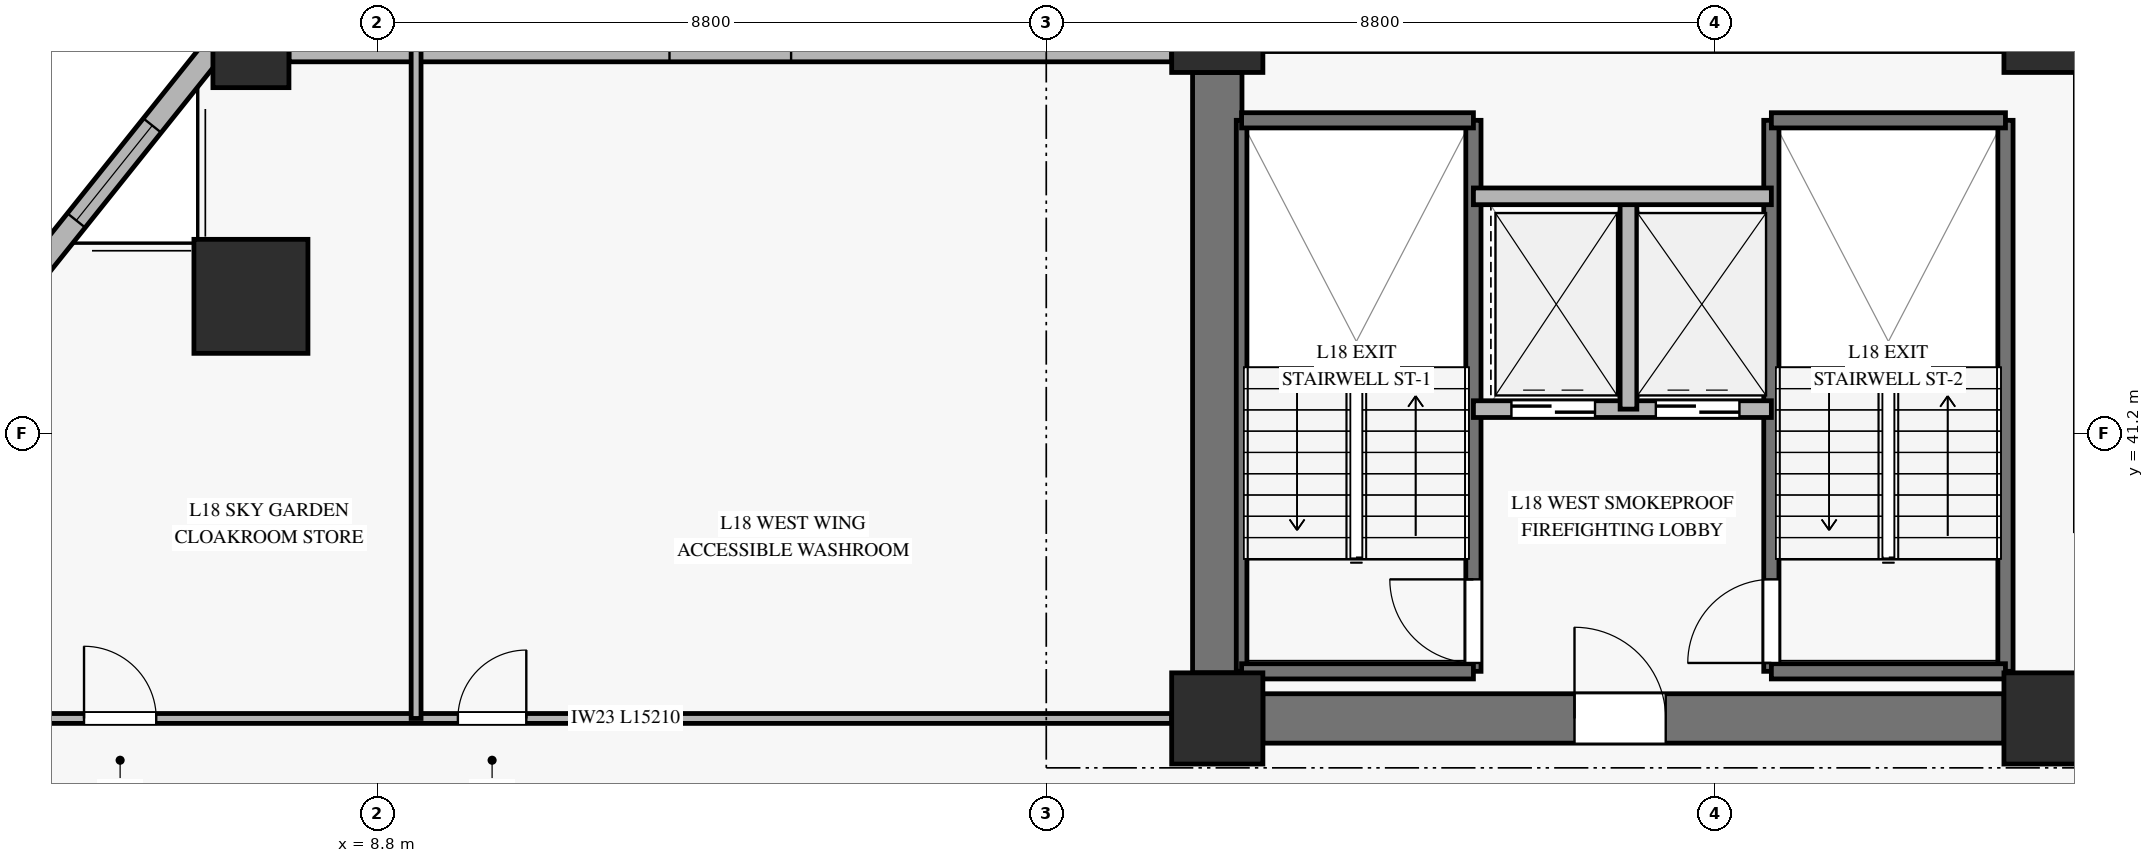
"""IFC4 building model, lengths in metres.
Left out: names, types, materials, properties, quantities, classifications, styles, units other than length and angle.
Written with IfcOpenShell. Run it as: python <this file> out.ifc"""

import sys

from ifc_helpers import new_model, si_unit, direction, frame, frame_2d, origin, origin_2d, place, context, subcontext, project, spatial, rectangle, hollow_rectangle, extrude, source, transform, mapped, element, fill, save


model = new_model("IFC4")
c1 = context("Model", 3, precision=1e-05, world=origin(), true_north=direction((0.0, 1.0)))
c2 = subcontext(c1, "Body", "Model", "MODEL_VIEW")
j1 = project(units=[si_unit("LENGTHUNIT", "METRE"), si_unit("PLANEANGLEUNIT", "RADIAN")], contexts=[c1])
p1 = place(None, origin())
s1 = spatial("IfcSite", under=j1, at=p1, CompositionType="ELEMENT")
p2 = place(p1, origin())
s2 = spatial("IfcBuilding", under=s1, at=p2, CompositionType="ELEMENT")
p3 = place(p2, frame((0.0, 0.0, 72.8)))
s3 = spatial("IfcBuildingStorey", under=s2, at=p3, CompositionType="ELEMENT", Elevation=72.8)
m1 = source(origin(), c2, "Body", "SweptSolid", [
    extrude(rectangle(XDim=1.2, YDim=1.2, at=origin_2d()), origin(), (0.0, 0.0, 1.0), 6.58),
])
for number, where, z_axis, x_axis in (
    (1, (19.85, 37.45, 0.0), (0.0, 0.0, 1.0), (1.0, 0.0, 0.0)),
    (2, (19.85, 46.55, 0.0), (0.0, 0.0, 1.0), (1.0, 0.0, 0.0)),
    (3, (30.8, 37.45, 0.0), (0.0, 0.0, 1.0), (1.0, 0.0, 0.0)),
    (4, (30.8, 46.55, 0.0), (0.0, 0.0, 1.0), (1.0, 0.0, 0.0)),
):
    element("IfcColumn", number, at=place(p3, frame(where, z_axis=z_axis, x_axis=x_axis)), inside=s3, PredefinedType="PILASTER", context=c2, shape_type="MappedRepresentation", body=[
        mapped(m1, transform((0.0, 0.0, 0.0), x_axis=(1.0, 0.0, 0.0), y_axis=(0.0, 1.0, 0.0), z_axis=(0.0, 0.0, 1.0), scale=1.0)),
    ])
p4 = place(p3, frame((20.45, 37.45, 0.0), z_axis=(0.0, 0.0, 1.0), x_axis=(1.0, 0.0, 0.0)))
e5 = element("IfcWall", 5, at=p4, inside=s3, PredefinedType="SHEAR", context=c2, shape_type="SweptSolid", body=[
    extrude(rectangle(XDim=9.75, YDim=0.65, at=frame_2d((4.875, 0.0))), origin(), (0.0, 0.0, 1.0), 6.58),
])
p5 = place(p4, frame((4.1, 0.0, 0.0)))
e6 = element("IfcOpeningElement", 6, at=p5, cuts=e5, PredefinedType="OPENING", context=c2, shape_type="SweptSolid", body=[
    extrude(rectangle(XDim=1.2, YDim=2.15, at=frame_2d((0.6, 1.075))), frame((0.0, 0.335, 0.0), z_axis=(0.0, -1.0, 0.0), x_axis=(1.0, 0.0, 0.0)), (0.0, 0.0, 1.0), 0.67),
])
p6 = place(p3, frame((19.85, 38.05, 0.0), z_axis=(0.0, 0.0, 1.0), x_axis=(0.0, 1.0, 0.0)))
e7 = element("IfcWall", 7, at=p6, inside=s3, PredefinedType="SHEAR", context=c2, shape_type="SweptSolid", body=[
    extrude(rectangle(XDim=7.9, YDim=0.65, at=frame_2d((3.95, 0.0))), origin(), (0.0, 0.0, 1.0), 6.58),
])
m2 = source(origin(), c2, "Body", "SweptSolid", [
    extrude(hollow_rectangle(XDim=1.5, YDim=1.5, WallThickness=0.07, at=origin_2d()), origin(), (0.0, 0.0, 1.0), 6.58),
])
p7 = place(p3, frame((7.136, 43.004, 0.0), z_axis=(0.0, 0.0, 1.0), x_axis=(1.0, 0.0, 0.0)))
e8 = element("IfcColumn", 8, at=p7, inside=s3, PredefinedType="COLUMN", context=c2, shape_type="MappedRepresentation", body=[
    mapped(m2, transform((0.0, 0.0, 0.0), x_axis=(1.0, 0.0, 0.0), y_axis=(0.0, 1.0, 0.0), z_axis=(0.0, 0.0, 1.0), scale=1.0)),
])
m3 = source(origin(), c2, "Body", "SweptSolid", [
    extrude(hollow_rectangle(XDim=1.0, YDim=1.0, WallThickness=0.045, at=origin_2d()), origin(), (0.0, 0.0, 1.0), 6.58),
])
p8 = place(p3, frame((7.136, 46.25, 0.0), z_axis=(0.0, 0.0, 1.0), x_axis=(1.0, 0.0, 0.0)))
e9 = element("IfcColumn", 9, at=p8, inside=s3, PredefinedType="COLUMN", context=c2, shape_type="MappedRepresentation", body=[
    mapped(m3, transform((0.0, 0.0, 0.0), x_axis=(1.0, 0.0, 0.0), y_axis=(0.0, 1.0, 0.0), z_axis=(0.0, 0.0, 1.0), scale=1.0)),
])
p9 = place(p3, frame((7.636, 46.25, 0.0), z_axis=(0.0, 0.0, 1.0), x_axis=(1.0, 0.0, 0.0)))
e10 = element("IfcWall", 10, at=p9, inside=s3, PredefinedType="SOLIDWALL", context=c2, shape_type="SweptSolid", body=[
    extrude(rectangle(XDim=11.614, YDim=0.32, at=frame_2d((5.807, 0.0))), origin(), (0.0, 0.0, 1.0), 6.06),
])
p10 = place(p9, frame((5.007, 0.0, 0.45)))
e11 = element("IfcOpeningElement", 11, at=p10, cuts=e10, PredefinedType="OPENING", context=c2, shape_type="SweptSolid", body=[
    extrude(rectangle(XDim=1.6, YDim=2.0, at=frame_2d((0.8, 1.0))), frame((0.0, 0.17, 0.0), z_axis=(0.0, -1.0, 0.0), x_axis=(1.0, 0.0, 0.0)), (0.0, 0.0, 1.0), 0.34),
])
p11 = place(p3, frame((6.636, 46.25, 0.0), z_axis=(0.0, 0.0, 1.0), x_axis=(-0.624558938305, -0.780977677391, 0.0)))
e12 = element("IfcWall", 12, at=p11, inside=s3, PredefinedType="SOLIDWALL", context=c2, shape_type="SweptSolid", body=[
    extrude(rectangle(XDim=4.156, YDim=0.3, at=frame_2d((2.078, 0.0))), origin(), (0.0, 0.0, 1.0), 6.06),
])
p12 = place(p11, frame((1.278, 0.0, 0.45)))
e13 = element("IfcOpeningElement", 13, at=p12, cuts=e12, PredefinedType="OPENING", context=c2, shape_type="SweptSolid", body=[
    extrude(rectangle(XDim=1.6, YDim=2.0, at=frame_2d((0.8, 1.0))), frame((0.0, 0.16, 0.0), z_axis=(0.0, -1.0, 0.0), x_axis=(1.0, 0.0, 0.0)), (0.0, 0.0, 1.0), 0.32),
])
p13 = place(p3, frame((20.17, 38.07, 0.0), z_axis=(0.0, 0.0, 1.0), x_axis=(0.0, 1.0, 0.0)))
e14 = element("IfcWall", 14, at=p13, inside=s3, PredefinedType="SOLIDWALL", context=c2, shape_type="SweptSolid", body=[
    extrude(rectangle(XDim=7.25, YDim=0.14, at=frame_2d((3.625, 0.0))), origin(), (0.0, 0.0, 1.0), 6.8),
])
p14 = place(p3, frame((23.22, 38.07, 0.0), z_axis=(0.0, 0.0, 1.0), x_axis=(0.0, 1.0, 0.0)))
e15 = element("IfcWall", 15, at=p14, inside=s3, PredefinedType="SOLIDWALL", context=c2, shape_type="SweptSolid", body=[
    extrude(rectangle(XDim=7.25, YDim=0.2, at=frame_2d((3.625, 0.0))), origin(), (0.0, 0.0, 1.0), 6.8),
])
p15 = place(p14, frame((0.11, 0.0, 0.0)))
e16 = element("IfcOpeningElement", 16, at=p15, cuts=e15, PredefinedType="OPENING", context=c2, shape_type="SweptSolid", body=[
    extrude(rectangle(XDim=1.1, YDim=2.15, at=frame_2d((0.55, 1.075))), frame((0.0, 0.11, 0.0), z_axis=(0.0, -1.0, 0.0), x_axis=(1.0, 0.0, 0.0)), (0.0, 0.0, 1.0), 0.22),
])
for number, where, z_axis, x_axis in (
    (17, (20.17, 45.32, 0.0), (0.0, 0.0, 1.0), (1.0, 0.0, 0.0)),
    (18, (20.17, 38.07, 0.0), (0.0, 0.0, 1.0), (1.0, 0.0, 0.0)),
):
    element("IfcWall", number, at=place(p3, frame(where, z_axis=z_axis, x_axis=x_axis)), inside=s3, PredefinedType="SOLIDWALL", context=c2, shape_type="SweptSolid", body=[
        extrude(rectangle(XDim=3.05, YDim=0.2, at=frame_2d((1.525, 0.0))), origin(), (0.0, 0.0, 1.0), 6.8),
    ])
p16 = place(p3, frame((27.14, 38.07, 0.0), z_axis=(0.0, 0.0, 1.0), x_axis=(0.0, 1.0, 0.0)))
e19 = element("IfcWall", 19, at=p16, inside=s3, PredefinedType="SOLIDWALL", context=c2, shape_type="SweptSolid", body=[
    extrude(rectangle(XDim=7.25, YDim=0.2, at=frame_2d((3.625, 0.0))), origin(), (0.0, 0.0, 1.0), 6.8),
])
p17 = place(p16, frame((0.11, 0.0, 0.0)))
e20 = element("IfcOpeningElement", 20, at=p17, cuts=e19, PredefinedType="OPENING", context=c2, shape_type="SweptSolid", body=[
    extrude(rectangle(XDim=1.1, YDim=2.15, at=frame_2d((0.55, 1.075))), frame((0.0, 0.11, 0.0), z_axis=(0.0, -1.0, 0.0), x_axis=(1.0, 0.0, 0.0)), (0.0, 0.0, 1.0), 0.22),
])
p18 = place(p3, frame((30.22, 38.07, 0.0), z_axis=(0.0, 0.0, 1.0), x_axis=(0.0, 1.0, 0.0)))
e21 = element("IfcWall", 21, at=p18, inside=s3, PredefinedType="SOLIDWALL", context=c2, shape_type="SweptSolid", body=[
    extrude(rectangle(XDim=7.25, YDim=0.2, at=frame_2d((3.625, 0.0))), origin(), (0.0, 0.0, 1.0), 6.8),
])
for number, where, z_axis, x_axis in (
    (22, (27.14, 45.32, 0.0), (0.0, 0.0, 1.0), (1.0, 0.0, 0.0)),
    (23, (27.14, 38.07, 0.0), (0.0, 0.0, 1.0), (1.0, 0.0, 0.0)),
):
    element("IfcWall", number, at=place(p3, frame(where, z_axis=z_axis, x_axis=x_axis)), inside=s3, PredefinedType="SOLIDWALL", context=c2, shape_type="SweptSolid", body=[
        extrude(rectangle(XDim=3.08, YDim=0.2, at=frame_2d((1.54, 0.0))), origin(), (0.0, 0.0, 1.0), 6.8),
    ])
p19 = place(p3, frame((23.22, 41.52, 0.0), z_axis=(0.0, 0.0, 1.0), x_axis=(1.0, 0.0, 0.0)))
e24 = element("IfcWall", 24, at=p19, inside=s3, PredefinedType="SOLIDWALL", context=c2, shape_type="SweptSolid", body=[
    extrude(rectangle(XDim=3.92, YDim=0.22, at=frame_2d((1.96, 0.0))), origin(), (0.0, 0.0, 1.0), 6.58),
])
p20 = place(p19, frame((0.5, 0.0, 0.0)))
e25 = element("IfcOpeningElement", 25, at=p20, cuts=e24, PredefinedType="OPENING", context=c2, shape_type="SweptSolid", body=[
    extrude(rectangle(XDim=1.1, YDim=2.2, at=frame_2d((0.55, 1.1))), frame((0.0, 0.12, 0.0), z_axis=(0.0, -1.0, 0.0), x_axis=(1.0, 0.0, 0.0)), (0.0, 0.0, 1.0), 0.24),
])
p21 = place(p19, frame((2.4, 0.0, 0.0)))
e26 = element("IfcOpeningElement", 26, at=p21, cuts=e24, PredefinedType="OPENING", context=c2, shape_type="SweptSolid", body=[
    extrude(rectangle(XDim=1.1, YDim=2.2, at=frame_2d((0.55, 1.1))), frame((0.0, 0.12, 0.0), z_axis=(0.0, -1.0, 0.0), x_axis=(1.0, 0.0, 0.0)), (0.0, 0.0, 1.0), 0.24),
])
p22 = place(p3, frame((25.26, 41.52, 0.0), z_axis=(0.0, 0.0, 1.0), x_axis=(0.0, 1.0, 0.0)))
e27 = element("IfcWall", 27, at=p22, inside=s3, PredefinedType="SOLIDWALL", context=c2, shape_type="SweptSolid", body=[
    extrude(rectangle(XDim=2.8, YDim=0.22, at=frame_2d((1.4, 0.0))), origin(), (0.0, 0.0, 1.0), 6.58),
])
p23 = place(p3, frame((23.22, 44.32, 0.0), z_axis=(0.0, 0.0, 1.0), x_axis=(1.0, 0.0, 0.0)))
e28 = element("IfcWall", 28, at=p23, inside=s3, PredefinedType="SOLIDWALL", context=c2, shape_type="SweptSolid", body=[
    extrude(rectangle(XDim=3.92, YDim=0.22, at=frame_2d((1.96, 0.0))), origin(), (0.0, 0.0, 1.0), 6.58),
])
p24 = place(p3, frame((4.04, 37.45, 0.0), z_axis=(0.0, 0.0, 1.0), x_axis=(1.0, 0.0, 0.0)))
e29 = element("IfcWall", 29, at=p24, inside=s3, PredefinedType="PARTITIONING", context=c2, shape_type="SweptSolid", body=[
    extrude(rectangle(XDim=15.21, YDim=0.13, at=frame_2d((7.605, 0.0))), origin(), (0.0, 0.0, 1.0), 6.065),
])
p25 = place(p24, frame((0.9, 0.0, 0.0)))
e30 = element("IfcOpeningElement", 30, at=p25, cuts=e29, PredefinedType="OPENING", context=c2, shape_type="SweptSolid", body=[
    extrude(rectangle(XDim=0.95, YDim=2.1, at=frame_2d((0.475, 1.05))), frame((0.0, 0.075, 0.0), z_axis=(0.0, -1.0, 0.0), x_axis=(1.0, 0.0, 0.0)), (0.0, 0.0, 1.0), 0.15),
])
p26 = place(p24, frame((5.819, 0.0, 0.0)))
e31 = element("IfcOpeningElement", 31, at=p26, cuts=e29, PredefinedType="OPENING", context=c2, shape_type="SweptSolid", body=[
    extrude(rectangle(XDim=0.9, YDim=2.1, at=frame_2d((0.45, 1.05))), frame((0.0, 0.075, 0.0), z_axis=(0.0, -1.0, 0.0), x_axis=(1.0, 0.0, 0.0)), (0.0, 0.0, 1.0), 0.15),
])
p27 = place(p3, frame((9.309, 37.45, 0.0), z_axis=(0.0, 0.0, 1.0), x_axis=(0.0, 1.0, 0.0)))
e32 = element("IfcWall", 32, at=p27, inside=s3, PredefinedType="PARTITIONING", context=c2, shape_type="SweptSolid", body=[
    extrude(rectangle(XDim=8.8, YDim=0.13, at=frame_2d((4.4, 0.0))), origin(), (0.0, 0.0, 1.0), 6.58),
])
m4 = source(origin(), c2, "Body", "SweptSolid", [
    extrude(rectangle(XDim=1.6, YDim=2.0, at=frame_2d((0.8, 1.0))), frame((0.0, 0.03, 0.0), z_axis=(0.0, -1.0, 0.0), x_axis=(1.0, 0.0, 0.0)), (0.0, 0.0, 1.0), 0.06),
])
p28 = place(p12, origin())
e33 = element("IfcWindow", 33, at=p28, inside=s3, PartitioningType="SINGLE_PANEL", PredefinedType="WINDOW", context=c2, shape_type="MappedRepresentation", body=[
    mapped(m4, transform((0.0, 0.0, 0.0), x_axis=(1.0, 0.0, 0.0), y_axis=(0.0, 1.0, 0.0), z_axis=(0.0, 0.0, 1.0), scale=1.0)),
])
fill(e13, e33)
m5 = source(origin(), c2, "Body", "SweptSolid", [
    extrude(rectangle(XDim=1.1, YDim=2.15, at=frame_2d((0.55, 1.075))), frame((0.0, 0.025, 0.0), z_axis=(0.0, -1.0, 0.0), x_axis=(1.0, 0.0, 0.0)), (0.0, 0.0, 1.0), 0.05),
])
p29 = place(p15, origin())
e34 = element("IfcDoor", 34, at=p29, inside=s3, OperationType="SINGLE_SWING_RIGHT", PredefinedType="DOOR", context=c2, shape_type="MappedRepresentation", body=[
    mapped(m5, transform((0.0, 0.0, 0.0), x_axis=(1.0, 0.0, 0.0), y_axis=(0.0, 1.0, 0.0), z_axis=(0.0, 0.0, 1.0), scale=1.0)),
])
fill(e16, e34)
p30 = place(p17, origin())
e35 = element("IfcDoor", 35, at=p30, inside=s3, OperationType="SINGLE_SWING_LEFT", PredefinedType="DOOR", context=c2, shape_type="MappedRepresentation", body=[
    mapped(m5, transform((0.0, 0.0, 0.0), x_axis=(1.0, 0.0, 0.0), y_axis=(0.0, 1.0, 0.0), z_axis=(0.0, 0.0, 1.0), scale=1.0)),
])
fill(e20, e35)
m6 = source(origin(), c2, "Body", "SweptSolid", [
    extrude(rectangle(XDim=1.1, YDim=2.2, at=frame_2d((0.55, 1.1))), frame((0.0, 0.025, 0.0), z_axis=(0.0, -1.0, 0.0), x_axis=(1.0, 0.0, 0.0)), (0.0, 0.0, 1.0), 0.05),
])
p31 = place(p20, origin())
e36 = element("IfcDoor", 36, at=p31, inside=s3, OperationType="SLIDING_TO_LEFT", PredefinedType="DOOR", context=c2, shape_type="MappedRepresentation", body=[
    mapped(m6, transform((0.0, 0.0, 0.0), x_axis=(1.0, 0.0, 0.0), y_axis=(0.0, 1.0, 0.0), z_axis=(0.0, 0.0, 1.0), scale=1.0)),
])
fill(e25, e36)
p32 = place(p21, origin())
e37 = element("IfcDoor", 37, at=p32, inside=s3, OperationType="SLIDING_TO_LEFT", PredefinedType="DOOR", context=c2, shape_type="MappedRepresentation", body=[
    mapped(m6, transform((0.0, 0.0, 0.0), x_axis=(1.0, 0.0, 0.0), y_axis=(0.0, 1.0, 0.0), z_axis=(0.0, 0.0, 1.0), scale=1.0)),
])
fill(e26, e37)
m7 = source(origin(), c2, "Body", "SweptSolid", [
    extrude(rectangle(XDim=1.2, YDim=2.15, at=frame_2d((0.6, 1.075))), frame((0.0, 0.025, 0.0), z_axis=(0.0, -1.0, 0.0), x_axis=(1.0, 0.0, 0.0)), (0.0, 0.0, 1.0), 0.05),
])
p33 = place(p5, origin())
e38 = element("IfcDoor", 38, at=p33, inside=s3, OperationType="SINGLE_SWING_LEFT", PredefinedType="DOOR", context=c2, shape_type="MappedRepresentation", body=[
    mapped(m7, transform((0.0, 0.0, 0.0), x_axis=(1.0, 0.0, 0.0), y_axis=(0.0, 1.0, 0.0), z_axis=(0.0, 0.0, 1.0), scale=1.0)),
])
fill(e6, e38)
m8 = source(origin(), c2, "Body", "SweptSolid", [
    extrude(rectangle(XDim=0.95, YDim=2.1, at=frame_2d((0.475, 1.05))), frame((0.0, 0.025, 0.0), z_axis=(0.0, -1.0, 0.0), x_axis=(1.0, 0.0, 0.0)), (0.0, 0.0, 1.0), 0.05),
])
p34 = place(p25, origin())
e39 = element("IfcDoor", 39, at=p34, inside=s3, OperationType="SINGLE_SWING_LEFT", PredefinedType="DOOR", context=c2, shape_type="MappedRepresentation", body=[
    mapped(m8, transform((0.0, 0.0, 0.0), x_axis=(1.0, 0.0, 0.0), y_axis=(0.0, 1.0, 0.0), z_axis=(0.0, 0.0, 1.0), scale=1.0)),
])
fill(e30, e39)
m9 = source(origin(), c2, "Body", "SweptSolid", [
    extrude(rectangle(XDim=0.9, YDim=2.1, at=frame_2d((0.45, 1.05))), frame((0.0, 0.025, 0.0), z_axis=(0.0, -1.0, 0.0), x_axis=(1.0, 0.0, 0.0)), (0.0, 0.0, 1.0), 0.05),
])
p35 = place(p26, origin())
e40 = element("IfcDoor", 40, at=p35, inside=s3, OperationType="SINGLE_SWING_RIGHT", PredefinedType="DOOR", context=c2, shape_type="MappedRepresentation", body=[
    mapped(m9, transform((0.0, 0.0, 0.0), x_axis=(1.0, 0.0, 0.0), y_axis=(0.0, 1.0, 0.0), z_axis=(0.0, 0.0, 1.0), scale=1.0)),
])
fill(e31, e40)
save(model, sys.argv[1])
